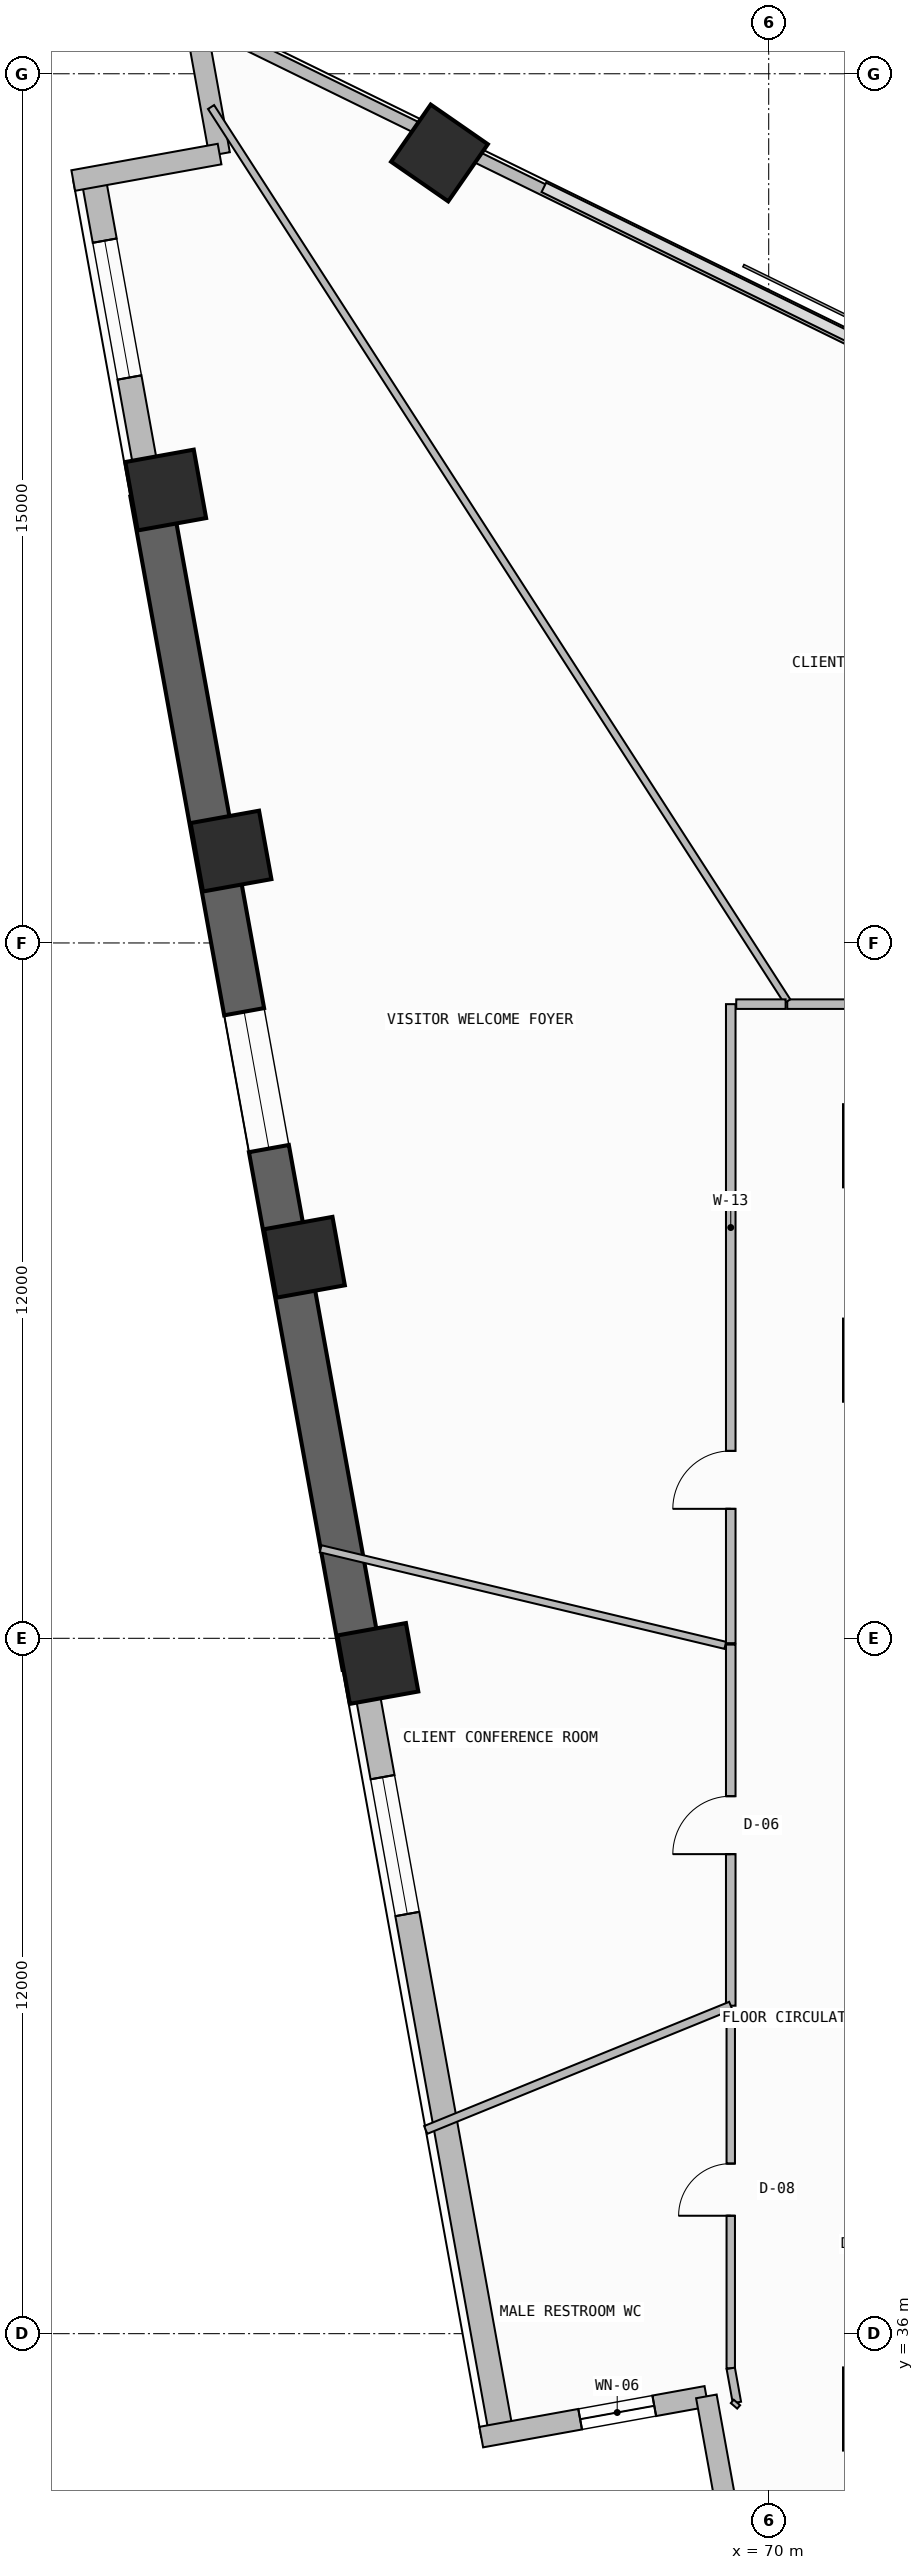
"""IFC4 building model, lengths in metres.
Left out: names, types, materials, properties, quantities, classifications, styles, units other than length and angle.
Written with IfcOpenShell. Run it as: python <this file> out.ifc"""

import sys

from ifc_helpers import new_model, si_unit, direction, frame, frame_2d, origin, origin_2d, place, context, subcontext, project, spatial, rectangle, extrude, element, fill, save


model = new_model("IFC4")
c1 = context("Model", 3, precision=1e-05, world=origin(), true_north=direction((0.0, 1.0)))
c2 = subcontext(c1, "Body", "Model", "MODEL_VIEW")
j1 = project(units=[si_unit("LENGTHUNIT", "METRE"), si_unit("PLANEANGLEUNIT", "RADIAN")], contexts=[c1])
p1 = place(None, origin())
s1 = spatial("IfcSite", under=j1, at=p1, CompositionType="ELEMENT")
p2 = place(p1, origin())
s2 = spatial("IfcBuilding", under=s1, at=p2, CompositionType="ELEMENT")
p3 = place(p2, frame((0.0, 0.0, 95.7)))
s3 = spatial("IfcBuildingStorey", under=s2, at=p3, CompositionType="ELEMENT", Elevation=95.7)
for number, where, z_axis, x_axis in (
    (1, (64.318, 73.633, -0.4), (0.0, 0.0, 1.0), (0.57, 0.822, 0.0)),
    (2, (59.594, 67.816, -0.4), (0.0, 0.0, 1.0), (-0.178, 0.984, 0.0)),
    (3, (60.72, 61.585, -0.4), (0.0, 0.0, 1.0), (-0.178, 0.984, 0.0)),
    (4, (61.988, 54.575, -0.4), (0.0, 0.0, 1.0), (-0.178, 0.984, 0.0)),
    (5, (63.255, 47.566, -0.4), (0.0, 0.0, 1.0), (-0.178, 0.984, 0.0)),
):
    element("IfcColumn", number, at=place(p3, frame(where, z_axis=z_axis, x_axis=x_axis)), inside=s3, PredefinedType="COLUMN", context=c2, shape_type="SweptSolid", body=[
        extrude(rectangle(XDim=1.2, YDim=1.2, at=origin_2d()), origin(), (0.0, 0.0, 1.0), 4.0),
    ])
p4 = place(p3, frame((69.565, 31.377, 0.0), z_axis=(0.0, 0.0, 1.0), x_axis=(0.98404091451, 0.177942346197, 0.0)))
e6 = element("IfcWall", 6, at=p4, inside=s3, PredefinedType="SOLIDWALL", context=c2, shape_type="SweptSolid", body=[
    extrude(rectangle(XDim=15.583, YDim=0.42, at=frame_2d((7.792, 0.0))), origin(), (0.0, 0.0, 1.0), 3.34),
])
p5 = place(p4, frame((10.5, 0.0, 1.2)))
e7 = element("IfcOpeningElement", 7, at=p5, cuts=e6, PredefinedType="OPENING", context=c2, shape_type="SweptSolid", body=[
    extrude(rectangle(XDim=2.4, YDim=0.9, at=frame_2d((1.2, 0.45))), frame((0.0, 0.22, 0.0), z_axis=(0.0, -1.0, 0.0), x_axis=(1.0, 0.0, 0.0)), (0.0, 0.0, 1.0), 0.44),
])
p6 = place(p3, frame((58.342, 73.22, 0.0), z_axis=(0.0, 0.0, 1.0), x_axis=(0.177981837245, -0.984033772597, 0.0)))
e8 = element("IfcWall", 8, at=p6, inside=s3, PredefinedType="SOLIDWALL", context=c2, shape_type="SweptSolid", body=[
    extrude(rectangle(XDim=5.54, YDim=0.42, at=frame_2d((2.77, 0.0))), origin(), (0.0, 0.0, 1.0), 2.725),
])
p7 = place(p6, frame((1.118, 0.0, 1.2)))
e9 = element("IfcOpeningElement", 9, at=p7, cuts=e8, PredefinedType="OPENING", context=c2, shape_type="SweptSolid", body=[
    extrude(rectangle(XDim=2.4, YDim=0.9, at=frame_2d((1.2, 0.45))), frame((0.0, 0.22, 0.0), z_axis=(0.0, -1.0, 0.0), x_axis=(1.0, 0.0, 0.0)), (0.0, 0.0, 1.0), 0.44),
])
p8 = place(p3, frame((59.328, 67.768, -0.4), z_axis=(0.0, 0.0, 1.0), x_axis=(0.177933213615, -0.984042565895, 0.0)))
e10 = element("IfcWall", 10, at=p8, inside=s3, PredefinedType="SHEAR", context=c2, shape_type="SweptSolid", body=[
    extrude(rectangle(XDim=20.579, YDim=0.7, at=frame_2d((10.289, 0.0))), origin(), (0.0, 0.0, 1.0), 3.74),
])
p9 = place(p8, frame((9.1, 0.0, 1.2)))
e11 = element("IfcOpeningElement", 11, at=p9, cuts=e10, PredefinedType="OPENING", context=c2, shape_type="SweptSolid", body=[
    extrude(rectangle(XDim=2.4, YDim=0.9, at=frame_2d((1.2, 0.45))), frame((0.0, 0.36, 0.0), z_axis=(0.0, -1.0, 0.0), x_axis=(1.0, 0.0, 0.0)), (0.0, 0.0, 1.0), 0.72),
])
p10 = place(p3, frame((62.99, 47.518, 0.0), z_axis=(0.0, 0.0, 1.0), x_axis=(0.177948058674, -0.984039881516, 0.0)))
e12 = element("IfcWall", 12, at=p10, inside=s3, PredefinedType="SOLIDWALL", context=c2, shape_type="SweptSolid", body=[
    extrude(rectangle(XDim=13.455, YDim=0.42, at=frame_2d((6.728, 0.0))), origin(), (0.0, 0.0, 1.0), 2.725),
])
p11 = place(p10, frame((1.945, 0.0, 1.2)))
e13 = element("IfcOpeningElement", 13, at=p11, cuts=e12, PredefinedType="OPENING", context=c2, shape_type="SweptSolid", body=[
    extrude(rectangle(XDim=2.4, YDim=0.9, at=frame_2d((1.2, 0.45))), frame((0.0, 0.22, 0.0), z_axis=(0.0, -1.0, 0.0), x_axis=(1.0, 0.0, 0.0)), (0.0, 0.0, 1.0), 0.44),
])
p12 = place(p3, frame((60.066, 76.139, 0.0), z_axis=(0.0, 0.0, 1.0), x_axis=(0.177897493713, -0.984049024048, 0.0)))
e14 = element("IfcWall", 14, at=p12, inside=s3, PredefinedType="SOLIDWALL", context=c2, shape_type="SweptSolid", body=[
    extrude(rectangle(XDim=2.566, YDim=0.36, at=frame_2d((1.283, 0.0))), origin(), (0.0, 0.0, 1.0), 3.34),
])
p13 = place(p3, frame((60.523, 73.614, 0.0), z_axis=(0.0, 0.0, 1.0), x_axis=(-0.984046012923, -0.177914149102, 0.0)))
e15 = element("IfcWall", 15, at=p13, inside=s3, PredefinedType="SOLIDWALL", context=c2, shape_type="SweptSolid", body=[
    extrude(rectangle(XDim=2.566, YDim=0.36, at=frame_2d((1.283, 0.0))), origin(), (0.0, 0.0, 1.0), 3.34),
])
p14 = place(p3, frame((65.039, 34.215, 0.0), z_axis=(0.0, 0.0, 1.0), x_axis=(0.984046535247, 0.177911260096, 0.0)))
e16 = element("IfcWall", 16, at=p14, inside=s3, PredefinedType="SOLIDWALL", context=c2, shape_type="SweptSolid", body=[
    extrude(rectangle(XDim=3.948, YDim=0.36, at=frame_2d((1.974, 0.0))), origin(), (0.0, 0.0, 1.0), 3.34),
])
p15 = place(p14, frame((1.734, 0.0, 0.45)))
e17 = element("IfcOpeningElement", 17, at=p15, cuts=e16, PredefinedType="OPENING", context=c2, shape_type="SweptSolid", body=[
    extrude(rectangle(XDim=1.3, YDim=2.4, at=frame_2d((0.65, 1.2))), frame((0.0, 0.19, 0.0), z_axis=(0.0, -1.0, 0.0), x_axis=(1.0, 0.0, 0.0)), (0.0, 0.0, 1.0), 0.38),
])
p16 = place(p3, frame((68.924, 34.917, 0.0), z_axis=(0.0, 0.0, 1.0), x_axis=(0.177981971326, -0.984033748346, 0.0)))
e18 = element("IfcWall", 18, at=p16, inside=s3, PredefinedType="SOLIDWALL", context=c2, shape_type="SweptSolid", body=[
    extrude(rectangle(XDim=3.948, YDim=0.36, at=frame_2d((1.974, 0.0))), origin(), (0.0, 0.0, 1.0), 3.34),
])
p17 = place(p3, frame((88.921, 61.823, 0.0), z_axis=(0.0, 0.0, 1.0), x_axis=(-0.897993533426, 0.440008652103, 0.0)))
e19 = element("IfcWall", 19, at=p17, inside=s3, PredefinedType="PARAPET", context=c2, shape_type="SweptSolid", body=[
    extrude(rectangle(XDim=26.864, YDim=0.2, at=frame_2d((13.432, 0.0))), origin(), (0.0, 0.0, 1.0), 1.15),
])
p18 = place(p3, frame((64.032, 74.018, 0.0), z_axis=(0.0, 0.0, 1.0), x_axis=(-0.89799103332, 0.440013754417, 0.0)))
e20 = element("IfcWall", 20, at=p18, inside=s3, PredefinedType="PARAPET", context=c2, shape_type="SweptSolid", body=[
    extrude(rectangle(XDim=3.955, YDim=0.2, at=frame_2d((1.978, 0.0))), origin(), (0.0, 0.0, 1.0), 1.15),
])
p19 = place(p3, frame((69.345, 47.891, 0.0), z_axis=(0.0, 0.0, 1.0), x_axis=(0.0, -1.0, 0.0)))
e21 = element("IfcWall", 21, at=p19, inside=s3, PredefinedType="PARTITIONING", context=c2, shape_type="SweptSolid", body=[
    extrude(rectangle(XDim=6.232, YDim=0.165, at=frame_2d((3.116, 0.0))), origin(), (0.0, 0.0, 1.0), 3.34),
])
p20 = place(p19, frame((2.616, 0.0, 0.0)))
e22 = element("IfcOpeningElement", 22, at=p20, cuts=e21, PredefinedType="OPENING", context=c2, shape_type="SweptSolid", body=[
    extrude(rectangle(XDim=1.0, YDim=2.2, at=frame_2d((0.5, 1.1))), frame((0.0, 0.093, 0.0), z_axis=(0.0, -1.0, 0.0), x_axis=(1.0, 0.0, 0.0)), (0.0, 0.0, 1.0), 0.185),
])
p21 = place(p3, frame((69.345, 41.659, 0.0), z_axis=(0.0, 0.0, 1.0), x_axis=(-0.926175162965, -0.377093579244, 0.0)))
e23 = element("IfcWall", 23, at=p21, inside=s3, PredefinedType="PARTITIONING", context=c2, shape_type="SweptSolid", body=[
    extrude(rectangle(XDim=5.684, YDim=0.145, at=frame_2d((2.842, 0.0))), origin(), (0.0, 0.0, 1.0), 3.34),
])
p22 = place(p3, frame((62.267, 49.545, 0.0), z_axis=(0.0, 0.0, 1.0), x_axis=(0.972677629919, -0.23215991957, 0.0)))
e24 = element("IfcWall", 24, at=p22, inside=s3, PredefinedType="PARTITIONING", context=c2, shape_type="SweptSolid", body=[
    extrude(rectangle(XDim=7.179, YDim=0.125, at=frame_2d((3.59, 0.0))), origin(), (0.0, 0.0, 1.0), 2.725),
])
p23 = place(p3, frame((69.345, 41.568, 0.0), z_axis=(0.0, 0.0, 1.0), x_axis=(0.0, -1.0, 0.0)))
e25 = element("IfcWall", 25, at=p23, inside=s3, PredefinedType="PARTITIONING", context=c2, shape_type="SweptSolid", body=[
    extrude(rectangle(XDim=6.167, YDim=0.145, at=frame_2d((3.083, 0.0))), origin(), (0.0, 0.0, 1.0), 3.34),
])
p24 = place(p23, frame((2.633, 0.0, 0.0)))
e26 = element("IfcOpeningElement", 26, at=p24, cuts=e25, PredefinedType="OPENING", context=c2, shape_type="SweptSolid", body=[
    extrude(rectangle(XDim=0.9, YDim=2.1, at=frame_2d((0.45, 1.05))), frame((0.0, 0.083, 0.0), z_axis=(0.0, -1.0, 0.0), x_axis=(1.0, 0.0, 0.0)), (0.0, 0.0, 1.0), 0.165),
])
p25 = place(p3, frame((69.345, 35.402, 0.0), z_axis=(0.0, 0.0, 1.0), x_axis=(0.177808691313, -0.984065073709, 0.0)))
e27 = element("IfcWall", 27, at=p25, inside=s3, PredefinedType="PARTITIONING", context=c2, shape_type="SweptSolid", body=[
    extrude(rectangle(XDim=0.599, YDim=0.145, at=frame_2d((0.299, 0.0))), origin(), (0.0, 0.0, 1.0), 3.34),
])
p26 = place(p3, frame((69.451, 34.812, 0.0), z_axis=(0.0, 0.0, 1.0), x_axis=(-0.652876925523, -0.757464005825, 0.0)))
e28 = element("IfcWall", 28, at=p26, inside=s3, PredefinedType="PARTITIONING", context=c2, shape_type="SweptSolid", body=[
    extrude(rectangle(XDim=0.077, YDim=0.145, at=frame_2d((0.039, 0.0))), origin(), (0.0, 0.0, 1.0), 3.34),
])
p27 = place(p3, frame((78.448, 58.944, 0.0), z_axis=(0.0, 0.0, 1.0), x_axis=(-1.0, 0.0, 0.0)))
e29 = element("IfcWall", 29, at=p27, inside=s3, PredefinedType="PARTITIONING", context=c2, shape_type="SweptSolid", body=[
    extrude(rectangle(XDim=8.127, YDim=0.165, at=frame_2d((4.064, 0.0))), origin(), (0.0, 0.0, 1.0), 2.725),
])
p28 = place(p27, frame((2.555, 0.0, 0.0)))
e30 = element("IfcOpeningElement", 30, at=p28, cuts=e29, PredefinedType="OPENING", context=c2, shape_type="SweptSolid", body=[
    extrude(rectangle(XDim=1.0, YDim=2.2, at=frame_2d((0.5, 1.1))), frame((0.0, 0.093, 0.0), z_axis=(0.0, -1.0, 0.0), x_axis=(1.0, 0.0, 0.0)), (0.0, 0.0, 1.0), 0.185),
])
p29 = place(p3, frame((70.32, 58.993, 0.0), z_axis=(0.0, 0.0, 1.0), x_axis=(-0.54165184829, 0.840602923647, 0.0)))
e31 = element("IfcWall", 31, at=p29, inside=s3, PredefinedType="PARTITIONING", context=c2, shape_type="SweptSolid", body=[
    extrude(rectangle(XDim=18.359, YDim=0.125, at=frame_2d((9.18, 0.0))), origin(), (0.0, 0.0, 1.0), 2.725),
])
p30 = place(p3, frame((69.345, 58.944, 0.0), z_axis=(0.0, 0.0, 1.0), x_axis=(0.0, -1.0, 0.0)))
e32 = element("IfcWall", 32, at=p30, inside=s3, PredefinedType="PARTITIONING", context=c2, shape_type="SweptSolid", body=[
    extrude(rectangle(XDim=11.028, YDim=0.165, at=frame_2d((5.514, 0.0))), origin(), (0.0, 0.0, 1.0), 2.725),
])
p31 = place(p30, frame((7.71, 0.0, 0.0)))
e33 = element("IfcOpeningElement", 33, at=p31, cuts=e32, PredefinedType="OPENING", context=c2, shape_type="SweptSolid", body=[
    extrude(rectangle(XDim=1.0, YDim=2.2, at=frame_2d((0.5, 1.1))), frame((0.0, 0.093, 0.0), z_axis=(0.0, -1.0, 0.0), x_axis=(1.0, 0.0, 0.0)), (0.0, 0.0, 1.0), 0.185),
])
p32 = place(p3, frame((70.292, 58.944, 0.0), z_axis=(0.0, 0.0, 1.0), x_axis=(-1.0, 0.0, 0.0)))
e34 = element("IfcWall", 34, at=p32, inside=s3, PredefinedType="PARTITIONING", context=c2, shape_type="SweptSolid", body=[
    extrude(rectangle(XDim=0.852, YDim=0.165, at=frame_2d((0.426, 0.0))), origin(), (0.0, 0.0, 1.0), 2.725),
])
p33 = place(p7, origin())
e35 = element("IfcWindow", 35, at=p33, inside=s3, PartitioningType="SINGLE_PANEL", PredefinedType="WINDOW", context=c2, shape_type="SweptSolid", body=[
    extrude(rectangle(XDim=2.4, YDim=0.9, at=frame_2d((1.2, 0.45))), frame((0.0, 0.03, 0.0), z_axis=(0.0, -1.0, 0.0), x_axis=(1.0, 0.0, 0.0)), (0.0, 0.0, 1.0), 0.06),
])
fill(e9, e35)
p34 = place(p9, origin())
e36 = element("IfcWindow", 36, at=p34, inside=s3, PartitioningType="SINGLE_PANEL", PredefinedType="WINDOW", context=c2, shape_type="SweptSolid", body=[
    extrude(rectangle(XDim=2.4, YDim=0.9, at=frame_2d((1.2, 0.45))), frame((0.0, 0.03, 0.0), z_axis=(0.0, -1.0, 0.0), x_axis=(1.0, 0.0, 0.0)), (0.0, 0.0, 1.0), 0.06),
])
fill(e11, e36)
p35 = place(p11, origin())
e37 = element("IfcWindow", 37, at=p35, inside=s3, PartitioningType="SINGLE_PANEL", PredefinedType="WINDOW", context=c2, shape_type="SweptSolid", body=[
    extrude(rectangle(XDim=2.4, YDim=0.9, at=frame_2d((1.2, 0.45))), frame((0.0, 0.03, 0.0), z_axis=(0.0, -1.0, 0.0), x_axis=(1.0, 0.0, 0.0)), (0.0, 0.0, 1.0), 0.06),
])
fill(e13, e37)
p36 = place(p15, origin())
e38 = element("IfcWindow", 38, at=p36, inside=s3, PartitioningType="SINGLE_PANEL", PredefinedType="WINDOW", context=c2, shape_type="SweptSolid", body=[
    extrude(rectangle(XDim=1.3, YDim=2.4, at=frame_2d((0.65, 1.2))), frame((0.0, 0.03, 0.0), z_axis=(0.0, -1.0, 0.0), x_axis=(1.0, 0.0, 0.0)), (0.0, 0.0, 1.0), 0.06),
])
fill(e17, e38)
p37 = place(p20, frame((1.0, 0.0, 0.0), z_axis=(0.0, 0.0, 1.0), x_axis=(-1.0, 0.0, 0.0)))
e39 = element("IfcDoor", 39, at=p37, inside=s3, OperationType="SINGLE_SWING_LEFT", PredefinedType="DOOR", context=c2, shape_type="SweptSolid", body=[
    extrude(rectangle(XDim=1.0, YDim=2.2, at=frame_2d((0.5, 1.1))), frame((0.0, 0.025, 0.0), z_axis=(0.0, -1.0, 0.0), x_axis=(1.0, 0.0, 0.0)), (0.0, 0.0, 1.0), 0.05),
])
fill(e22, e39)
p38 = place(p24, frame((0.9, 0.0, 0.0), z_axis=(0.0, 0.0, 1.0), x_axis=(-1.0, 0.0, 0.0)))
e40 = element("IfcDoor", 40, at=p38, inside=s3, OperationType="SINGLE_SWING_LEFT", PredefinedType="DOOR", context=c2, shape_type="SweptSolid", body=[
    extrude(rectangle(XDim=0.9, YDim=2.1, at=frame_2d((0.45, 1.05))), frame((0.0, 0.025, 0.0), z_axis=(0.0, -1.0, 0.0), x_axis=(1.0, 0.0, 0.0)), (0.0, 0.0, 1.0), 0.05),
])
fill(e26, e40)
p39 = place(p31, frame((1.0, 0.0, 0.0), z_axis=(0.0, 0.0, 1.0), x_axis=(-1.0, 0.0, 0.0)))
e41 = element("IfcDoor", 41, at=p39, inside=s3, OperationType="SINGLE_SWING_LEFT", PredefinedType="DOOR", context=c2, shape_type="SweptSolid", body=[
    extrude(rectangle(XDim=1.0, YDim=2.2, at=frame_2d((0.5, 1.1))), frame((0.0, 0.025, 0.0), z_axis=(0.0, -1.0, 0.0), x_axis=(1.0, 0.0, 0.0)), (0.0, 0.0, 1.0), 0.05),
])
fill(e33, e41)
save(model, sys.argv[1])
